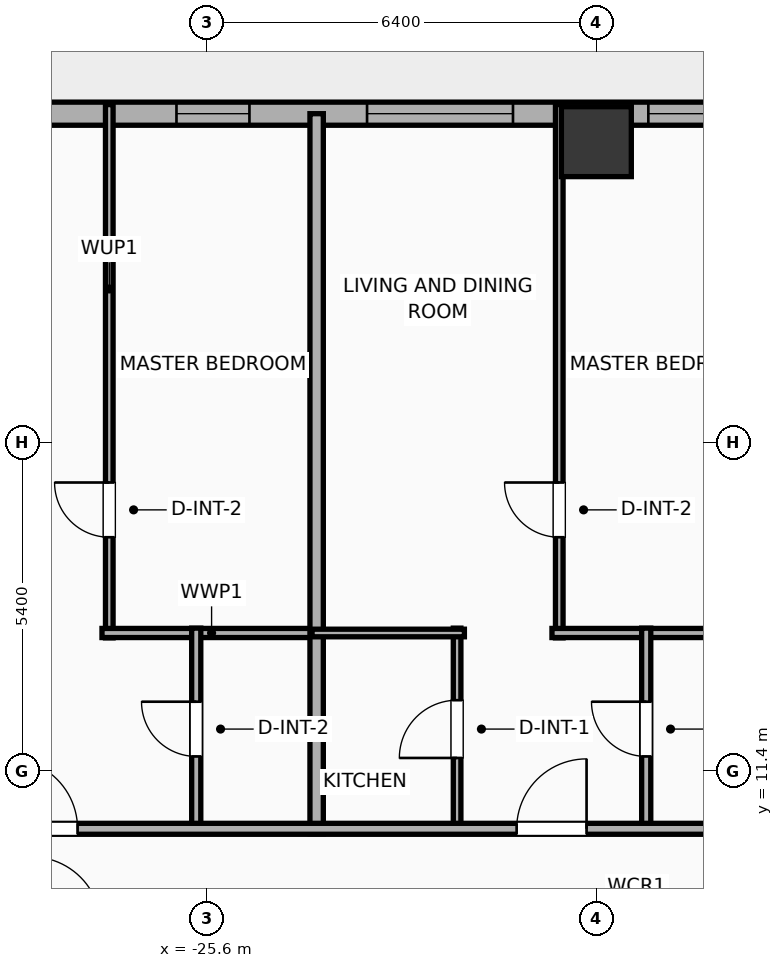
"""IFC4 building model, lengths in metres.
Left out: names, types, materials, properties, quantities, classifications, styles, units other than length and angle.
Written with IfcOpenShell. Run it as: python <this file> out.ifc"""

import sys

from ifc_helpers import new_model, si_unit, direction, frame, frame_2d, origin, origin_2d, place, context, subcontext, project, spatial, rectangle, hollow_rectangle, extrude, element, fill, save


model = new_model("IFC4")
c1 = context("Model", 3, precision=1e-05, world=origin(), true_north=direction((0.0, 1.0)))
c2 = subcontext(c1, "Body", "Model", "MODEL_VIEW")
j1 = project(units=[si_unit("LENGTHUNIT", "METRE"), si_unit("PLANEANGLEUNIT", "RADIAN")], contexts=[c1])
p1 = place(None, origin())
s1 = spatial("IfcSite", under=j1, at=p1, CompositionType="ELEMENT")
p2 = place(p1, origin())
s2 = spatial("IfcBuilding", under=s1, at=p2, CompositionType="ELEMENT")
p3 = place(p2, frame((0.0, 0.0, 26.0)))
s3 = spatial("IfcBuildingStorey", under=s2, at=p3, CompositionType="ELEMENT", Elevation=26.0)
p4 = place(p3, frame((-19.2, 21.75, -0.25), z_axis=(0.0, 0.0, 1.0), x_axis=(1.0, 0.0, 0.0)))
e1 = element("IfcColumn", 1, at=p4, inside=s3, PredefinedType="COLUMN", context=c2, shape_type="SweptSolid", body=[
    extrude(hollow_rectangle(XDim=1.15, YDim=1.15, WallThickness=0.04, at=origin_2d()), origin(), (0.0, 0.0, 1.0), 4.15),
])
p5 = place(p3, frame((-29.581, 22.21, 0.0), z_axis=(0.0, 0.0, 1.0), x_axis=(1.0, 0.0, 0.0)))
e2 = element("IfcWall", 2, at=p5, inside=s3, PredefinedType="ELEMENTEDWALL", context=c2, shape_type="SweptSolid", body=[
    extrude(rectangle(XDim=51.963, YDim=0.38, at=frame_2d((25.981, 0.0))), origin(), (0.0, 0.0, 1.0), 2.54),
])
p6 = place(p5, frame((6.61, 0.0, 0.75)))
e3 = element("IfcOpeningElement", 3, at=p6, cuts=e2, PredefinedType="OPENING", context=c2, shape_type="SweptSolid", body=[
    extrude(rectangle(XDim=2.4, YDim=1.63, at=frame_2d((1.2, 0.815))), frame((0.0, 0.2, 0.0), z_axis=(0.0, -1.0, 0.0), x_axis=(1.0, 0.0, 0.0)), (0.0, 0.0, 1.0), 0.4),
])
p7 = place(p5, frame((24.781, 0.0, 0.75)))
e4 = element("IfcOpeningElement", 4, at=p7, cuts=e2, PredefinedType="OPENING", context=c2, shape_type="SweptSolid", body=[
    extrude(rectangle(XDim=2.4, YDim=1.63, at=frame_2d((1.2, 0.815))), frame((0.0, 0.2, 0.0), z_axis=(0.0, -1.0, 0.0), x_axis=(1.0, 0.0, 0.0)), (0.0, 0.0, 1.0), 0.4),
])
p8 = place(p5, frame((42.952, 0.0, 0.75)))
e5 = element("IfcOpeningElement", 5, at=p8, cuts=e2, PredefinedType="OPENING", context=c2, shape_type="SweptSolid", body=[
    extrude(rectangle(XDim=2.4, YDim=1.63, at=frame_2d((1.2, 0.815))), frame((0.0, 0.2, 0.0), z_axis=(0.0, -1.0, 0.0), x_axis=(1.0, 0.0, 0.0)), (0.0, 0.0, 1.0), 0.4),
])
p9 = place(p5, frame((3.476, 0.0, 0.75)))
e6 = element("IfcOpeningElement", 6, at=p9, cuts=e2, PredefinedType="OPENING", context=c2, shape_type="SweptSolid", body=[
    extrude(rectangle(XDim=1.2, YDim=1.63, at=frame_2d((0.6, 0.815))), frame((0.0, 0.2, 0.0), z_axis=(0.0, -1.0, 0.0), x_axis=(1.0, 0.0, 0.0)), (0.0, 0.0, 1.0), 0.4),
])
p10 = place(p5, frame((11.236, 0.0, 0.75)))
e7 = element("IfcOpeningElement", 7, at=p10, cuts=e2, PredefinedType="OPENING", context=c2, shape_type="SweptSolid", body=[
    extrude(rectangle(XDim=1.2, YDim=1.63, at=frame_2d((0.6, 0.815))), frame((0.0, 0.2, 0.0), z_axis=(0.0, -1.0, 0.0), x_axis=(1.0, 0.0, 0.0)), (0.0, 0.0, 1.0), 0.4),
])
p11 = place(p5, frame((14.576, 0.0, 0.75)))
e8 = element("IfcOpeningElement", 8, at=p11, cuts=e2, PredefinedType="OPENING", context=c2, shape_type="SweptSolid", body=[
    extrude(rectangle(XDim=1.2, YDim=1.63, at=frame_2d((0.6, 0.815))), frame((0.0, 0.2, 0.0), z_axis=(0.0, -1.0, 0.0), x_axis=(1.0, 0.0, 0.0)), (0.0, 0.0, 1.0), 0.4),
])
p12 = place(p5, frame((18.276, 0.0, 0.75)))
e9 = element("IfcOpeningElement", 9, at=p12, cuts=e2, PredefinedType="OPENING", context=c2, shape_type="SweptSolid", body=[
    extrude(rectangle(XDim=1.2, YDim=1.63, at=frame_2d((0.6, 0.815))), frame((0.0, 0.2, 0.0), z_axis=(0.0, -1.0, 0.0), x_axis=(1.0, 0.0, 0.0)), (0.0, 0.0, 1.0), 0.4),
])
p13 = place(p5, frame((21.976, 0.0, 0.75)))
e10 = element("IfcOpeningElement", 10, at=p13, cuts=e2, PredefinedType="OPENING", context=c2, shape_type="SweptSolid", body=[
    extrude(rectangle(XDim=1.2, YDim=1.63, at=frame_2d((0.6, 0.815))), frame((0.0, 0.2, 0.0), z_axis=(0.0, -1.0, 0.0), x_axis=(1.0, 0.0, 0.0)), (0.0, 0.0, 1.0), 0.4),
])
p14 = place(p5, frame((29.136, 0.0, 0.75)))
e11 = element("IfcOpeningElement", 11, at=p14, cuts=e2, PredefinedType="OPENING", context=c2, shape_type="SweptSolid", body=[
    extrude(rectangle(XDim=1.2, YDim=1.63, at=frame_2d((0.6, 0.815))), frame((0.0, 0.2, 0.0), z_axis=(0.0, -1.0, 0.0), x_axis=(1.0, 0.0, 0.0)), (0.0, 0.0, 1.0), 0.4),
])
p15 = place(p5, frame((33.076, 0.0, 0.75)))
e12 = element("IfcOpeningElement", 12, at=p15, cuts=e2, PredefinedType="OPENING", context=c2, shape_type="SweptSolid", body=[
    extrude(rectangle(XDim=1.2, YDim=1.63, at=frame_2d((0.6, 0.815))), frame((0.0, 0.2, 0.0), z_axis=(0.0, -1.0, 0.0), x_axis=(1.0, 0.0, 0.0)), (0.0, 0.0, 1.0), 0.4),
])
p16 = place(p5, frame((36.776, 0.0, 0.75)))
e13 = element("IfcOpeningElement", 13, at=p16, cuts=e2, PredefinedType="OPENING", context=c2, shape_type="SweptSolid", body=[
    extrude(rectangle(XDim=1.2, YDim=1.63, at=frame_2d((0.6, 0.815))), frame((0.0, 0.2, 0.0), z_axis=(0.0, -1.0, 0.0), x_axis=(1.0, 0.0, 0.0)), (0.0, 0.0, 1.0), 0.4),
])
p17 = place(p5, frame((39.931, 0.0, 0.75)))
e14 = element("IfcOpeningElement", 14, at=p17, cuts=e2, PredefinedType="OPENING", context=c2, shape_type="SweptSolid", body=[
    extrude(rectangle(XDim=0.85, YDim=1.63, at=frame_2d((0.425, 0.815))), frame((0.0, 0.2, 0.0), z_axis=(0.0, -1.0, 0.0), x_axis=(1.0, 0.0, 0.0)), (0.0, 0.0, 1.0), 0.4),
])
p18 = place(p5, frame((47.469, 0.0, 0.75)))
e15 = element("IfcOpeningElement", 15, at=p18, cuts=e2, PredefinedType="OPENING", context=c2, shape_type="SweptSolid", body=[
    extrude(rectangle(XDim=1.2, YDim=1.63, at=frame_2d((0.6, 0.815))), frame((0.0, 0.2, 0.0), z_axis=(0.0, -1.0, 0.0), x_axis=(1.0, 0.0, 0.0)), (0.0, 0.0, 1.0), 0.4),
])
p19 = place(p5, frame((49.581, 0.0, 0.75)))
e16 = element("IfcOpeningElement", 16, at=p19, cuts=e2, PredefinedType="OPENING", context=c2, shape_type="SweptSolid", body=[
    extrude(rectangle(XDim=1.2, YDim=1.63, at=frame_2d((0.6, 0.815))), frame((0.0, 0.2, 0.0), z_axis=(0.0, -1.0, 0.0), x_axis=(1.0, 0.0, 0.0)), (0.0, 0.0, 1.0), 0.4),
])
p20 = place(p3, frame((-27.21, 13.59, 0.0), z_axis=(0.0, 0.0, 1.0), x_axis=(0.0, 1.0, 0.0)))
e17 = element("IfcWall", 17, at=p20, inside=s3, PredefinedType="PARTITIONING", context=c2, shape_type="SweptSolid", body=[
    extrude(rectangle(XDim=8.77, YDim=0.125, at=frame_2d((4.385, 0.0))), origin(), (0.0, 0.0, 1.0), 3.65),
])
p21 = place(p20, frame((1.655, 0.0, 0.0)))
e18 = element("IfcOpeningElement", 18, at=p21, cuts=e17, PredefinedType="OPENING", context=c2, shape_type="SweptSolid", body=[
    extrude(rectangle(XDim=0.9, YDim=2.05, at=frame_2d((0.45, 1.025))), frame((0.0, 0.073, 0.0), z_axis=(0.0, -1.0, 0.0), x_axis=(1.0, 0.0, 0.0)), (0.0, 0.0, 1.0), 0.145),
])
p22 = place(p3, frame((-27.33, 13.67, 0.0), z_axis=(0.0, 0.0, 1.0), x_axis=(1.0, 0.0, 0.0)))
e19 = element("IfcWall", 19, at=p22, inside=s3, PredefinedType="PLUMBINGWALL", context=c2, shape_type="SweptSolid", body=[
    extrude(rectangle(XDim=3.605, YDim=0.15, at=frame_2d((1.802, 0.0))), origin(), (0.0, 0.0, 1.0), 3.65),
])
p23 = place(p3, frame((-25.78, 10.43, 0.0), z_axis=(0.0, 0.0, 1.0), x_axis=(0.0, 1.0, 0.0)))
e20 = element("IfcWall", 20, at=p23, inside=s3, PredefinedType="PLUMBINGWALL", context=c2, shape_type="SweptSolid", body=[
    extrude(rectangle(XDim=3.32, YDim=0.15, at=frame_2d((1.66, 0.0))), origin(), (0.0, 0.0, 1.0), 3.65),
])
p24 = place(p23, frame((1.21, 0.0, 0.0)))
e21 = element("IfcOpeningElement", 21, at=p24, cuts=e20, PredefinedType="OPENING", context=c2, shape_type="SweptSolid", body=[
    extrude(rectangle(XDim=0.9, YDim=2.05, at=frame_2d((0.45, 1.025))), frame((0.0, 0.085, 0.0), z_axis=(0.0, -1.0, 0.0), x_axis=(1.0, 0.0, 0.0)), (0.0, 0.0, 1.0), 0.17),
])
p25 = place(p3, frame((-23.8, 10.37, 0.0), z_axis=(0.0, 0.0, 1.0), x_axis=(0.0, 1.0, 0.0)))
e22 = element("IfcWall", 22, at=p25, inside=s3, PredefinedType="PARTITIONING", context=c2, shape_type="SweptSolid", body=[
    extrude(rectangle(XDim=11.84, YDim=0.22, at=frame_2d((5.92, 0.0))), origin(), (0.0, 0.0, 1.0), 3.65),
])
p26 = place(p3, frame((-19.81, 13.59, 0.0), z_axis=(0.0, 0.0, 1.0), x_axis=(0.0, 1.0, 0.0)))
e23 = element("IfcWall", 23, at=p26, inside=s3, PredefinedType="PARTITIONING", context=c2, shape_type="SweptSolid", body=[
    extrude(rectangle(XDim=8.77, YDim=0.125, at=frame_2d((4.385, 0.0))), origin(), (0.0, 0.0, 1.0), 2.54),
])
p27 = place(p26, frame((1.655, 0.0, 0.0)))
e24 = element("IfcOpeningElement", 24, at=p27, cuts=e23, PredefinedType="OPENING", context=c2, shape_type="SweptSolid", body=[
    extrude(rectangle(XDim=0.9, YDim=2.05, at=frame_2d((0.45, 1.025))), frame((0.0, 0.073, 0.0), z_axis=(0.0, -1.0, 0.0), x_axis=(1.0, 0.0, 0.0)), (0.0, 0.0, 1.0), 0.145),
])
p28 = place(p3, frame((-19.93, 13.67, 0.0), z_axis=(0.0, 0.0, 1.0), x_axis=(1.0, 0.0, 0.0)))
e25 = element("IfcWall", 25, at=p28, inside=s3, PredefinedType="PLUMBINGWALL", context=c2, shape_type="SweptSolid", body=[
    extrude(rectangle(XDim=3.605, YDim=0.15, at=frame_2d((1.802, 0.0))), origin(), (0.0, 0.0, 1.0), 3.65),
])
p29 = place(p3, frame((-21.49, 10.43, 0.0), z_axis=(0.0, 0.0, 1.0), x_axis=(0.0, 1.0, 0.0)))
e26 = element("IfcWall", 26, at=p29, inside=s3, PredefinedType="PARTITIONING", context=c2, shape_type="SweptSolid", body=[
    extrude(rectangle(XDim=3.32, YDim=0.125, at=frame_2d((1.66, 0.0))), origin(), (0.0, 0.0, 1.0), 3.65),
])
p30 = place(p29, frame((1.185, 0.0, 0.0)))
e27 = element("IfcOpeningElement", 27, at=p30, cuts=e26, PredefinedType="OPENING", context=c2, shape_type="SweptSolid", body=[
    extrude(rectangle(XDim=0.95, YDim=2.05, at=frame_2d((0.475, 1.025))), frame((0.0, 0.073, 0.0), z_axis=(0.0, -1.0, 0.0), x_axis=(1.0, 0.0, 0.0)), (0.0, 0.0, 1.0), 0.145),
])
p31 = place(p3, frame((-23.875, 13.67, 0.0), z_axis=(0.0, 0.0, 1.0), x_axis=(1.0, 0.0, 0.0)))
e28 = element("IfcWall", 28, at=p31, inside=s3, PredefinedType="PARTITIONING", context=c2, shape_type="SweptSolid", body=[
    extrude(rectangle(XDim=2.505, YDim=0.125, at=frame_2d((1.252, 0.0))), origin(), (0.0, 0.0, 1.0), 3.65),
])
p32 = place(p3, frame((-18.38, 10.43, 0.0), z_axis=(0.0, 0.0, 1.0), x_axis=(0.0, 1.0, 0.0)))
e29 = element("IfcWall", 29, at=p32, inside=s3, PredefinedType="PLUMBINGWALL", context=c2, shape_type="SweptSolid", body=[
    extrude(rectangle(XDim=3.32, YDim=0.15, at=frame_2d((1.66, 0.0))), origin(), (0.0, 0.0, 1.0), 3.65),
])
p33 = place(p32, frame((1.21, 0.0, 0.0)))
e30 = element("IfcOpeningElement", 30, at=p33, cuts=e29, PredefinedType="OPENING", context=c2, shape_type="SweptSolid", body=[
    extrude(rectangle(XDim=0.9, YDim=2.05, at=frame_2d((0.45, 1.025))), frame((0.0, 0.085, 0.0), z_axis=(0.0, -1.0, 0.0), x_axis=(1.0, 0.0, 0.0)), (0.0, 0.0, 1.0), 0.17),
])
p34 = place(p3, frame((-33.41, 10.45, 0.0), z_axis=(0.0, 0.0, 1.0), x_axis=(1.0, 0.0, 0.0)))
e31 = element("IfcWall", 31, at=p34, inside=s3, PredefinedType="PARTITIONING", context=c2, shape_type="SweptSolid", body=[
    extrude(rectangle(XDim=59.62, YDim=0.18, at=frame_2d((29.81, 0.0))), origin(), (0.0, 0.0, 1.0), 3.65),
])
p35 = place(p34, frame((4.529, 0.0, 0.0)))
e32 = element("IfcOpeningElement", 32, at=p35, cuts=e31, PredefinedType="OPENING", context=c2, shape_type="SweptSolid", body=[
    extrude(rectangle(XDim=1.15, YDim=2.05, at=frame_2d((0.575, 1.025))), frame((0.0, 0.1, 0.0), z_axis=(0.0, -1.0, 0.0), x_axis=(1.0, 0.0, 0.0)), (0.0, 0.0, 1.0), 0.2),
])
p36 = place(p34, frame((12.899, 0.0, 0.0)))
e33 = element("IfcOpeningElement", 33, at=p36, cuts=e31, PredefinedType="OPENING", context=c2, shape_type="SweptSolid", body=[
    extrude(rectangle(XDim=1.15, YDim=2.05, at=frame_2d((0.575, 1.025))), frame((0.0, 0.1, 0.0), z_axis=(0.0, -1.0, 0.0), x_axis=(1.0, 0.0, 0.0)), (0.0, 0.0, 1.0), 0.2),
])
p37 = place(p34, frame((20.298, 0.0, 0.0)))
e34 = element("IfcOpeningElement", 34, at=p37, cuts=e31, PredefinedType="OPENING", context=c2, shape_type="SweptSolid", body=[
    extrude(rectangle(XDim=1.15, YDim=2.05, at=frame_2d((0.575, 1.025))), frame((0.0, 0.1, 0.0), z_axis=(0.0, -1.0, 0.0), x_axis=(1.0, 0.0, 0.0)), (0.0, 0.0, 1.0), 0.2),
])
p38 = place(p34, frame((27.703, 0.0, 0.0)))
e35 = element("IfcOpeningElement", 35, at=p38, cuts=e31, PredefinedType="OPENING", context=c2, shape_type="SweptSolid", body=[
    extrude(rectangle(XDim=1.15, YDim=2.05, at=frame_2d((0.575, 1.025))), frame((0.0, 0.1, 0.0), z_axis=(0.0, -1.0, 0.0), x_axis=(1.0, 0.0, 0.0)), (0.0, 0.0, 1.0), 0.2),
])
p39 = place(p34, frame((35.102, 0.0, 0.0)))
e36 = element("IfcOpeningElement", 36, at=p39, cuts=e31, PredefinedType="OPENING", context=c2, shape_type="SweptSolid", body=[
    extrude(rectangle(XDim=1.15, YDim=2.05, at=frame_2d((0.575, 1.025))), frame((0.0, 0.1, 0.0), z_axis=(0.0, -1.0, 0.0), x_axis=(1.0, 0.0, 0.0)), (0.0, 0.0, 1.0), 0.2),
])
p40 = place(p34, frame((42.5, 0.0, 0.0)))
e37 = element("IfcOpeningElement", 37, at=p40, cuts=e31, PredefinedType="OPENING", context=c2, shape_type="SweptSolid", body=[
    extrude(rectangle(XDim=1.15, YDim=2.05, at=frame_2d((0.575, 1.025))), frame((0.0, 0.1, 0.0), z_axis=(0.0, -1.0, 0.0), x_axis=(1.0, 0.0, 0.0)), (0.0, 0.0, 1.0), 0.2),
])
p41 = place(p34, frame((48.099, 0.0, 0.0)))
e38 = element("IfcOpeningElement", 38, at=p41, cuts=e31, PredefinedType="OPENING", context=c2, shape_type="SweptSolid", body=[
    extrude(rectangle(XDim=1.15, YDim=2.05, at=frame_2d((0.575, 1.025))), frame((0.0, 0.1, 0.0), z_axis=(0.0, -1.0, 0.0), x_axis=(1.0, 0.0, 0.0)), (0.0, 0.0, 1.0), 0.2),
])
p42 = place(p34, frame((56.117, 0.0, 0.0)))
e39 = element("IfcOpeningElement", 39, at=p42, cuts=e31, PredefinedType="OPENING", context=c2, shape_type="SweptSolid", body=[
    extrude(rectangle(XDim=0.9, YDim=2.05, at=frame_2d((0.45, 1.025))), frame((0.0, 0.1, 0.0), z_axis=(0.0, -1.0, 0.0), x_axis=(1.0, 0.0, 0.0)), (0.0, 0.0, 1.0), 0.2),
])
p43 = place(p6, origin())
e40 = element("IfcWindow", 40, at=p43, inside=s3, PartitioningType="SINGLE_PANEL", PredefinedType="WINDOW", context=c2, shape_type="SweptSolid", body=[
    extrude(rectangle(XDim=2.4, YDim=1.63, at=frame_2d((1.2, 0.815))), frame((0.0, 0.03, 0.0), z_axis=(0.0, -1.0, 0.0), x_axis=(1.0, 0.0, 0.0)), (0.0, 0.0, 1.0), 0.06),
])
fill(e3, e40)
p44 = place(p9, origin())
e41 = element("IfcWindow", 41, at=p44, inside=s3, PartitioningType="SINGLE_PANEL", PredefinedType="WINDOW", context=c2, shape_type="SweptSolid", body=[
    extrude(rectangle(XDim=1.2, YDim=1.63, at=frame_2d((0.6, 0.815))), frame((0.0, 0.03, 0.0), z_axis=(0.0, -1.0, 0.0), x_axis=(1.0, 0.0, 0.0)), (0.0, 0.0, 1.0), 0.06),
])
fill(e6, e41)
p45 = place(p10, origin())
e42 = element("IfcWindow", 42, at=p45, inside=s3, PartitioningType="SINGLE_PANEL", PredefinedType="WINDOW", context=c2, shape_type="SweptSolid", body=[
    extrude(rectangle(XDim=1.2, YDim=1.63, at=frame_2d((0.6, 0.815))), frame((0.0, 0.03, 0.0), z_axis=(0.0, -1.0, 0.0), x_axis=(1.0, 0.0, 0.0)), (0.0, 0.0, 1.0), 0.06),
])
fill(e7, e42)
p46 = place(p21, origin())
e43 = element("IfcDoor", 43, at=p46, inside=s3, OperationType="SINGLE_SWING_RIGHT", PredefinedType="DOOR", context=c2, shape_type="SweptSolid", body=[
    extrude(rectangle(XDim=0.9, YDim=2.05, at=frame_2d((0.45, 1.025))), frame((0.0, 0.025, 0.0), z_axis=(0.0, -1.0, 0.0), x_axis=(1.0, 0.0, 0.0)), (0.0, 0.0, 1.0), 0.05),
])
fill(e18, e43)
p47 = place(p24, origin())
e44 = element("IfcDoor", 44, at=p47, inside=s3, OperationType="SINGLE_SWING_RIGHT", PredefinedType="DOOR", context=c2, shape_type="SweptSolid", body=[
    extrude(rectangle(XDim=0.9, YDim=2.05, at=frame_2d((0.45, 1.025))), frame((0.0, 0.025, 0.0), z_axis=(0.0, -1.0, 0.0), x_axis=(1.0, 0.0, 0.0)), (0.0, 0.0, 1.0), 0.05),
])
fill(e21, e44)
p48 = place(p27, origin())
e45 = element("IfcDoor", 45, at=p48, inside=s3, OperationType="SINGLE_SWING_RIGHT", PredefinedType="DOOR", context=c2, shape_type="SweptSolid", body=[
    extrude(rectangle(XDim=0.9, YDim=2.05, at=frame_2d((0.45, 1.025))), frame((0.0, 0.025, 0.0), z_axis=(0.0, -1.0, 0.0), x_axis=(1.0, 0.0, 0.0)), (0.0, 0.0, 1.0), 0.05),
])
fill(e24, e45)
p49 = place(p30, origin())
e46 = element("IfcDoor", 46, at=p49, inside=s3, OperationType="SINGLE_SWING_LEFT", PredefinedType="DOOR", context=c2, shape_type="SweptSolid", body=[
    extrude(rectangle(XDim=0.95, YDim=2.05, at=frame_2d((0.475, 1.025))), frame((0.0, 0.025, 0.0), z_axis=(0.0, -1.0, 0.0), x_axis=(1.0, 0.0, 0.0)), (0.0, 0.0, 1.0), 0.05),
])
fill(e27, e46)
p50 = place(p33, origin())
e47 = element("IfcDoor", 47, at=p50, inside=s3, OperationType="SINGLE_SWING_RIGHT", PredefinedType="DOOR", context=c2, shape_type="SweptSolid", body=[
    extrude(rectangle(XDim=0.9, YDim=2.05, at=frame_2d((0.45, 1.025))), frame((0.0, 0.025, 0.0), z_axis=(0.0, -1.0, 0.0), x_axis=(1.0, 0.0, 0.0)), (0.0, 0.0, 1.0), 0.05),
])
fill(e30, e47)
p51 = place(p35, origin())
e48 = element("IfcDoor", 48, at=p51, inside=s3, OperationType="SINGLE_SWING_LEFT", PredefinedType="DOOR", context=c2, shape_type="SweptSolid", body=[
    extrude(rectangle(XDim=1.15, YDim=2.05, at=frame_2d((0.575, 1.025))), frame((0.0, 0.025, 0.0), z_axis=(0.0, -1.0, 0.0), x_axis=(1.0, 0.0, 0.0)), (0.0, 0.0, 1.0), 0.05),
])
fill(e32, e48)
p52 = place(p36, origin())
e49 = element("IfcDoor", 49, at=p52, inside=s3, OperationType="SINGLE_SWING_RIGHT", PredefinedType="DOOR", context=c2, shape_type="SweptSolid", body=[
    extrude(rectangle(XDim=1.15, YDim=2.05, at=frame_2d((0.575, 1.025))), frame((0.0, 0.025, 0.0), z_axis=(0.0, -1.0, 0.0), x_axis=(1.0, 0.0, 0.0)), (0.0, 0.0, 1.0), 0.05),
])
fill(e33, e49)
save(model, sys.argv[1])
